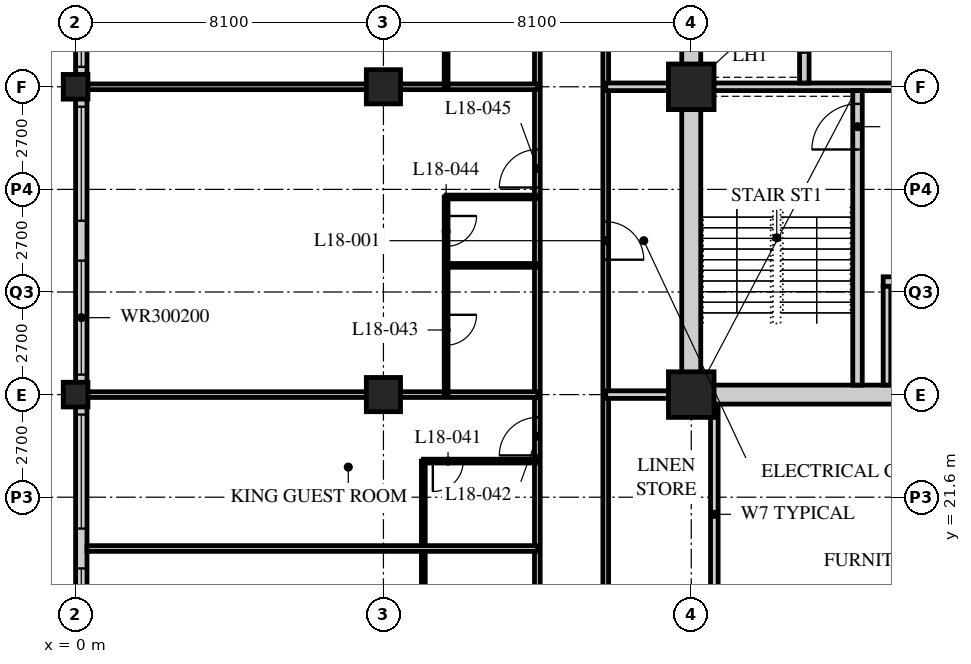
"""IFC4 building model, lengths in metres.
Left out: names, types, materials, properties, quantities, classifications, styles, units other than length and angle.
Written with IfcOpenShell. Run it as: python <this file> out.ifc"""

import sys

from ifc_helpers import new_model, si_unit, direction, frame, frame_2d, origin, origin_2d, place, context, subcontext, project, spatial, rectangle, hollow_rectangle, extrude, element, fill, save


model = new_model("IFC4")
c1 = context("Model", 3, precision=1e-05, world=origin(), true_north=direction((0.0, 1.0)))
c2 = subcontext(c1, "Body", "Model", "MODEL_VIEW")
j1 = project(units=[si_unit("LENGTHUNIT", "METRE"), si_unit("PLANEANGLEUNIT", "RADIAN")], contexts=[c1])
p1 = place(None, origin())
s1 = spatial("IfcSite", under=j1, at=p1, CompositionType="ELEMENT")
p2 = place(p1, origin())
s2 = spatial("IfcBuilding", under=s1, at=p2, CompositionType="ELEMENT")
p3 = place(p2, frame((0.0, 0.0, 73.8)))
s3 = spatial("IfcBuildingStorey", under=s2, at=p3, CompositionType="ELEMENT", Elevation=73.8)
for number, where, z_axis, x_axis in (
    (1, (0.0, 24.3, 0.0), (0.0, 0.0, 1.0), (1.0, 0.0, 0.0)),
    (2, (0.0, 32.4, 0.0), (0.0, 0.0, 1.0), (1.0, 0.0, 0.0)),
):
    element("IfcColumn", number, at=place(p3, frame(where, z_axis=z_axis, x_axis=x_axis)), inside=s3, PredefinedType="COLUMN", context=c2, shape_type="SweptSolid", body=[
        extrude(hollow_rectangle(XDim=0.65, YDim=0.65, WallThickness=0.05, at=origin_2d()), origin(), (0.0, 0.0, 1.0), 3.4),
    ])
for number, where, z_axis, x_axis in (
    (3, (8.1, 24.3, 0.0), (0.0, 0.0, 1.0), (1.0, 0.0, 0.0)),
    (4, (8.1, 32.4, 0.0), (0.0, 0.0, 1.0), (1.0, 0.0, 0.0)),
):
    element("IfcColumn", number, at=place(p3, frame(where, z_axis=z_axis, x_axis=x_axis)), inside=s3, PredefinedType="COLUMN", context=c2, shape_type="SweptSolid", body=[
        extrude(hollow_rectangle(XDim=0.9, YDim=0.9, WallThickness=0.09, at=origin_2d()), origin(), (0.0, 0.0, 1.0), 3.4),
    ])
for number, where, z_axis, x_axis in (
    (5, (16.2, 24.3, 0.0), (0.0, 0.0, 1.0), (1.0, 0.0, 0.0)),
    (6, (16.2, 32.4, 0.0), (0.0, 0.0, 1.0), (1.0, 0.0, 0.0)),
):
    element("IfcColumn", number, at=place(p3, frame(where, z_axis=z_axis, x_axis=x_axis)), inside=s3, PredefinedType="COLUMN", context=c2, shape_type="SweptSolid", body=[
        extrude(hollow_rectangle(XDim=1.2, YDim=1.2, WallThickness=0.12, at=origin_2d()), origin(), (0.0, 0.0, 1.0), 3.4),
    ])
p4 = place(p3, frame((0.15, 40.2, 0.0), z_axis=(0.0, 0.0, 1.0), x_axis=(0.0, -1.0, 0.0)))
e7 = element("IfcWall", 7, at=p4, inside=s3, PredefinedType="SOLIDWALL", context=c2, shape_type="SweptSolid", body=[
    extrude(rectangle(XDim=32.1, YDim=0.3, at=frame_2d((16.05, 0.0))), origin(), (0.0, 0.0, 1.0), 3.19),
])
p5 = place(p4, frame((0.225, 0.0, 0.9)))
e8 = element("IfcOpeningElement", 8, at=p5, cuts=e7, PredefinedType="OPENING", context=c2, shape_type="SweptSolid", body=[
    extrude(rectangle(XDim=3.0, YDim=2.0, at=frame_2d((1.5, 1.0))), frame((0.0, 0.16, 0.0), z_axis=(0.0, -1.0, 0.0), x_axis=(1.0, 0.0, 0.0)), (0.0, 0.0, 1.0), 0.32),
])
p6 = place(p4, frame((4.275, 0.0, 0.9)))
e9 = element("IfcOpeningElement", 9, at=p6, cuts=e7, PredefinedType="OPENING", context=c2, shape_type="SweptSolid", body=[
    extrude(rectangle(XDim=3.0, YDim=2.0, at=frame_2d((1.5, 1.0))), frame((0.0, 0.16, 0.0), z_axis=(0.0, -1.0, 0.0), x_axis=(1.0, 0.0, 0.0)), (0.0, 0.0, 1.0), 0.32),
])
p7 = place(p4, frame((8.325, 0.0, 0.9)))
e10 = element("IfcOpeningElement", 10, at=p7, cuts=e7, PredefinedType="OPENING", context=c2, shape_type="SweptSolid", body=[
    extrude(rectangle(XDim=3.0, YDim=2.0, at=frame_2d((1.5, 1.0))), frame((0.0, 0.16, 0.0), z_axis=(0.0, -1.0, 0.0), x_axis=(1.0, 0.0, 0.0)), (0.0, 0.0, 1.0), 0.32),
])
p8 = place(p4, frame((12.375, 0.0, 0.9)))
e11 = element("IfcOpeningElement", 11, at=p8, cuts=e7, PredefinedType="OPENING", context=c2, shape_type="SweptSolid", body=[
    extrude(rectangle(XDim=3.0, YDim=2.0, at=frame_2d((1.5, 1.0))), frame((0.0, 0.16, 0.0), z_axis=(0.0, -1.0, 0.0), x_axis=(1.0, 0.0, 0.0)), (0.0, 0.0, 1.0), 0.32),
])
p9 = place(p4, frame((16.425, 0.0, 0.9)))
e12 = element("IfcOpeningElement", 12, at=p9, cuts=e7, PredefinedType="OPENING", context=c2, shape_type="SweptSolid", body=[
    extrude(rectangle(XDim=3.0, YDim=2.0, at=frame_2d((1.5, 1.0))), frame((0.0, 0.16, 0.0), z_axis=(0.0, -1.0, 0.0), x_axis=(1.0, 0.0, 0.0)), (0.0, 0.0, 1.0), 0.32),
])
p10 = place(p4, frame((20.475, 0.0, 0.9)))
e13 = element("IfcOpeningElement", 13, at=p10, cuts=e7, PredefinedType="OPENING", context=c2, shape_type="SweptSolid", body=[
    extrude(rectangle(XDim=3.0, YDim=2.0, at=frame_2d((1.5, 1.0))), frame((0.0, 0.16, 0.0), z_axis=(0.0, -1.0, 0.0), x_axis=(1.0, 0.0, 0.0)), (0.0, 0.0, 1.0), 0.32),
])
p11 = place(p4, frame((24.525, 0.0, 0.9)))
e14 = element("IfcOpeningElement", 14, at=p11, cuts=e7, PredefinedType="OPENING", context=c2, shape_type="SweptSolid", body=[
    extrude(rectangle(XDim=3.0, YDim=2.0, at=frame_2d((1.5, 1.0))), frame((0.0, 0.16, 0.0), z_axis=(0.0, -1.0, 0.0), x_axis=(1.0, 0.0, 0.0)), (0.0, 0.0, 1.0), 0.32),
])
p12 = place(p4, frame((28.575, 0.0, 0.9)))
e15 = element("IfcOpeningElement", 15, at=p12, cuts=e7, PredefinedType="OPENING", context=c2, shape_type="SweptSolid", body=[
    extrude(rectangle(XDim=3.0, YDim=2.0, at=frame_2d((1.5, 1.0))), frame((0.0, 0.16, 0.0), z_axis=(0.0, -1.0, 0.0), x_axis=(1.0, 0.0, 0.0)), (0.0, 0.0, 1.0), 0.32),
])
p13 = place(p3, frame((12.15, 16.2, 0.0), z_axis=(0.0, 0.0, 1.0), x_axis=(0.0, 1.0, 0.0)))
e16 = element("IfcWall", 16, at=p13, inside=s3, PredefinedType="PARTITIONING", context=c2, shape_type="SweptSolid", body=[
    extrude(rectangle(XDim=26.1, YDim=0.15, at=frame_2d((13.05, 0.0))), origin(), (0.0, 0.0, 1.0), 3.19),
])
p14 = place(p13, frame((0.3, 0.0, 0.0)))
e17 = element("IfcOpeningElement", 17, at=p14, cuts=e16, PredefinedType="OPENING", context=c2, shape_type="SweptSolid", body=[
    extrude(rectangle(XDim=1.0, YDim=2.1, at=frame_2d((0.5, 1.05))), frame((0.0, 0.085, 0.0), z_axis=(0.0, -1.0, 0.0), x_axis=(1.0, 0.0, 0.0)), (0.0, 0.0, 1.0), 0.17),
])
p15 = place(p13, frame((6.5, 0.0, 0.0)))
e18 = element("IfcOpeningElement", 18, at=p15, cuts=e16, PredefinedType="OPENING", context=c2, shape_type="SweptSolid", body=[
    extrude(rectangle(XDim=1.0, YDim=2.1, at=frame_2d((0.5, 1.05))), frame((0.0, 0.085, 0.0), z_axis=(0.0, -1.0, 0.0), x_axis=(1.0, 0.0, 0.0)), (0.0, 0.0, 1.0), 0.17),
])
p16 = place(p13, frame((13.55, 0.0, 0.0)))
e19 = element("IfcOpeningElement", 19, at=p16, cuts=e16, PredefinedType="OPENING", context=c2, shape_type="SweptSolid", body=[
    extrude(rectangle(XDim=1.0, YDim=2.1, at=frame_2d((0.5, 1.05))), frame((0.0, 0.085, 0.0), z_axis=(0.0, -1.0, 0.0), x_axis=(1.0, 0.0, 0.0)), (0.0, 0.0, 1.0), 0.17),
])
p17 = place(p13, frame((21.65, 0.0, 0.0)))
e20 = element("IfcOpeningElement", 20, at=p17, cuts=e16, PredefinedType="OPENING", context=c2, shape_type="SweptSolid", body=[
    extrude(rectangle(XDim=1.0, YDim=2.1, at=frame_2d((0.5, 1.05))), frame((0.0, 0.085, 0.0), z_axis=(0.0, -1.0, 0.0), x_axis=(1.0, 0.0, 0.0)), (0.0, 0.0, 1.0), 0.17),
])
p18 = place(p3, frame((13.95, 40.5, 0.0), z_axis=(0.0, 0.0, 1.0), x_axis=(0.0, -1.0, 0.0)))
e21 = element("IfcWall", 21, at=p18, inside=s3, PredefinedType="PARTITIONING", context=c2, shape_type="SweptSolid", body=[
    extrude(rectangle(XDim=22.5, YDim=0.15, at=frame_2d((11.25, 0.0))), origin(), (0.0, 0.0, 1.0), 3.19),
])
p19 = place(p18, frame((11.65, 0.0, 0.0)))
e22 = element("IfcOpeningElement", 22, at=p19, cuts=e21, PredefinedType="OPENING", context=c2, shape_type="SweptSolid", body=[
    extrude(rectangle(XDim=1.0, YDim=2.1, at=frame_2d((0.5, 1.05))), frame((0.0, 0.085, 0.0), z_axis=(0.0, -1.0, 0.0), x_axis=(1.0, 0.0, 0.0)), (0.0, 0.0, 1.0), 0.17),
])
p20 = place(p18, frame((3.55, 0.0, 0.0)))
e23 = element("IfcOpeningElement", 23, at=p20, cuts=e21, PredefinedType="OPENING", context=c2, shape_type="SweptSolid", body=[
    extrude(rectangle(XDim=1.0, YDim=2.1, at=frame_2d((0.5, 1.05))), frame((0.0, 0.085, 0.0), z_axis=(0.0, -1.0, 0.0), x_axis=(1.0, 0.0, 0.0)), (0.0, 0.0, 1.0), 0.17),
])
p21 = place(p3, frame((13.95, 32.4, 0.0), z_axis=(0.0, 0.0, 1.0), x_axis=(1.0, 0.0, 0.0)))
e24 = element("IfcWall", 24, at=p21, inside=s3, PredefinedType="SOLIDWALL", context=c2, shape_type="SweptSolid", body=[
    extrude(rectangle(XDim=2.25, YDim=0.2, at=frame_2d((1.125, 0.0))), origin(), (0.0, 0.0, 1.0), 2.578),
])
p22 = place(p3, frame((16.807, 18.0, 0.0), z_axis=(0.0, 0.0, 1.0), x_axis=(0.0, 1.0, 0.0)))
e25 = element("IfcWall", 25, at=p22, inside=s3, PredefinedType="SOLIDWALL", context=c2, shape_type="SweptSolid", body=[
    extrude(rectangle(XDim=6.3, YDim=0.2, at=frame_2d((3.15, 0.0))), origin(), (0.0, 0.0, 1.0), 3.19),
])
p23 = place(p3, frame((13.95, 24.3, 0.0), z_axis=(0.0, 0.0, 1.0), x_axis=(1.0, 0.0, 0.0)))
e26 = element("IfcWall", 26, at=p23, inside=s3, PredefinedType="SOLIDWALL", context=c2, shape_type="SweptSolid", body=[
    extrude(rectangle(XDim=2.25, YDim=0.2, at=frame_2d((1.125, 0.0))), origin(), (0.0, 0.0, 1.0), 2.578),
])
p24 = place(p3, frame((9.15, 17.65, 0.0), z_axis=(0.0, 0.0, 1.0), x_axis=(0.0, 1.0, 0.0)))
e27 = element("IfcWall", 27, at=p24, inside=s3, PredefinedType="PARTITIONING", context=c2, shape_type="SweptSolid", body=[
    extrude(rectangle(XDim=4.9, YDim=0.1, at=frame_2d((2.45, 0.0))), origin(), (0.0, 0.0, 1.0), 3.19),
])
p25 = place(p3, frame((12.15, 20.25, 0.0), z_axis=(0.0, 0.0, 1.0), x_axis=(-1.0, 0.0, 0.0)))
e28 = element("IfcWall", 28, at=p25, inside=s3, PredefinedType="PARTITIONING", context=c2, shape_type="SweptSolid", body=[
    extrude(rectangle(XDim=11.85, YDim=0.15, at=frame_2d((5.925, 0.0))), origin(), (0.0, 0.0, 1.0), 3.19),
])
p26 = place(p3, frame((12.15, 22.55, 0.0), z_axis=(0.0, 0.0, 1.0), x_axis=(-1.0, 0.0, 0.0)))
e29 = element("IfcWall", 29, at=p26, inside=s3, PredefinedType="PARTITIONING", context=c2, shape_type="SweptSolid", body=[
    extrude(rectangle(XDim=3.0, YDim=0.1, at=frame_2d((1.5, 0.0))), origin(), (0.0, 0.0, 1.0), 3.19),
])
p27 = place(p26, frame((1.95, 0.0, 0.0)))
e30 = element("IfcOpeningElement", 30, at=p27, cuts=e29, PredefinedType="OPENING", context=c2, shape_type="SweptSolid", body=[
    extrude(rectangle(XDim=0.8, YDim=2.1, at=frame_2d((0.4, 1.05))), frame((0.0, 0.06, 0.0), z_axis=(0.0, -1.0, 0.0), x_axis=(1.0, 0.0, 0.0)), (0.0, 0.0, 1.0), 0.12),
])
p28 = place(p3, frame((12.15, 24.3, 0.0), z_axis=(0.0, 0.0, 1.0), x_axis=(-1.0, 0.0, 0.0)))
e31 = element("IfcWall", 31, at=p28, inside=s3, PredefinedType="PARTITIONING", context=c2, shape_type="SweptSolid", body=[
    extrude(rectangle(XDim=11.85, YDim=0.15, at=frame_2d((5.925, 0.0))), origin(), (0.0, 0.0, 1.0), 2.578),
])
p29 = place(p3, frame((9.75, 24.3, 0.0), z_axis=(0.0, 0.0, 1.0), x_axis=(0.0, 1.0, 0.0)))
e32 = element("IfcWall", 32, at=p29, inside=s3, PredefinedType="PARTITIONING", context=c2, shape_type="SweptSolid", body=[
    extrude(rectangle(XDim=5.2, YDim=0.1, at=frame_2d((2.6, 0.0))), origin(), (0.0, 0.0, 1.0), 3.19),
])
p30 = place(p29, frame((1.3, 0.0, 0.0)))
e33 = element("IfcOpeningElement", 33, at=p30, cuts=e32, PredefinedType="OPENING", context=c2, shape_type="SweptSolid", body=[
    extrude(rectangle(XDim=0.8, YDim=2.1, at=frame_2d((0.4, 1.05))), frame((0.0, 0.06, 0.0), z_axis=(0.0, -1.0, 0.0), x_axis=(1.0, 0.0, 0.0)), (0.0, 0.0, 1.0), 0.12),
])
p31 = place(p29, frame((3.9, 0.0, 0.0)))
e34 = element("IfcOpeningElement", 34, at=p31, cuts=e32, PredefinedType="OPENING", context=c2, shape_type="SweptSolid", body=[
    extrude(rectangle(XDim=0.8, YDim=2.1, at=frame_2d((0.4, 1.05))), frame((0.0, 0.06, 0.0), z_axis=(0.0, -1.0, 0.0), x_axis=(1.0, 0.0, 0.0)), (0.0, 0.0, 1.0), 0.12),
])
for number, where, z_axis, x_axis in (
    (35, (12.15, 27.7, 0.0), (0.0, 0.0, 1.0), (-1.0, 0.0, 0.0)),
    (36, (12.15, 29.5, 0.0), (0.0, 0.0, 1.0), (-1.0, 0.0, 0.0)),
):
    element("IfcWall", number, at=place(p3, frame(where, z_axis=z_axis, x_axis=x_axis)), inside=s3, PredefinedType="PARTITIONING", context=c2, shape_type="SweptSolid", body=[
        extrude(rectangle(XDim=2.4, YDim=0.1, at=frame_2d((1.2, 0.0))), origin(), (0.0, 0.0, 1.0), 3.19),
    ])
p32 = place(p3, frame((12.15, 32.4, 0.0), z_axis=(0.0, 0.0, 1.0), x_axis=(-1.0, 0.0, 0.0)))
e37 = element("IfcWall", 37, at=p32, inside=s3, PredefinedType="PARTITIONING", context=c2, shape_type="SweptSolid", body=[
    extrude(rectangle(XDim=11.85, YDim=0.15, at=frame_2d((5.925, 0.0))), origin(), (0.0, 0.0, 1.0), 2.578),
])
p33 = place(p3, frame((9.75, 32.4, 0.0), z_axis=(0.0, 0.0, 1.0), x_axis=(0.0, 1.0, 0.0)))
e38 = element("IfcWall", 38, at=p33, inside=s3, PredefinedType="PARTITIONING", context=c2, shape_type="SweptSolid", body=[
    extrude(rectangle(XDim=5.2, YDim=0.1, at=frame_2d((2.6, 0.0))), origin(), (0.0, 0.0, 1.0), 3.19),
])
p34 = place(p33, frame((1.3, 0.0, 0.0)))
e39 = element("IfcOpeningElement", 39, at=p34, cuts=e38, PredefinedType="OPENING", context=c2, shape_type="SweptSolid", body=[
    extrude(rectangle(XDim=0.8, YDim=2.1, at=frame_2d((0.4, 1.05))), frame((0.0, 0.06, 0.0), z_axis=(0.0, -1.0, 0.0), x_axis=(1.0, 0.0, 0.0)), (0.0, 0.0, 1.0), 0.12),
])
p35 = place(p33, frame((3.9, 0.0, 0.0)))
e40 = element("IfcOpeningElement", 40, at=p35, cuts=e38, PredefinedType="OPENING", context=c2, shape_type="SweptSolid", body=[
    extrude(rectangle(XDim=0.8, YDim=2.1, at=frame_2d((0.4, 1.05))), frame((0.0, 0.06, 0.0), z_axis=(0.0, -1.0, 0.0), x_axis=(1.0, 0.0, 0.0)), (0.0, 0.0, 1.0), 0.12),
])
p36 = place(p3, frame((15.95, 24.3, 0.0), z_axis=(0.0, 0.0, 1.0), x_axis=(1.0, 0.0, 0.0)))
e41 = element("IfcWall", 41, at=p36, inside=s3, PredefinedType="SOLIDWALL", context=c2, shape_type="SweptSolid", body=[
    extrude(rectangle(XDim=24.8, YDim=0.5, at=frame_2d((12.4, 0.0))), origin(), (0.0, 0.0, 1.0), 2.54),
])
p37 = place(p36, frame((11.5, 0.0, 0.0)))
e42 = element("IfcOpeningElement", 42, at=p37, cuts=e41, PredefinedType="OPENING", context=c2, shape_type="SweptSolid", body=[
    extrude(rectangle(XDim=1.8, YDim=2.4, at=frame_2d((0.9, 1.2))), frame((0.0, 0.26, 0.0), z_axis=(0.0, -1.0, 0.0), x_axis=(1.0, 0.0, 0.0)), (0.0, 0.0, 1.0), 0.52),
])
p38 = place(p3, frame((16.2, 24.55, 0.0), z_axis=(0.0, 0.0, 1.0), x_axis=(0.0, 1.0, 0.0)))
e43 = element("IfcWall", 43, at=p38, inside=s3, PredefinedType="SOLIDWALL", context=c2, shape_type="SweptSolid", body=[
    extrude(rectangle(XDim=15.7, YDim=0.5, at=frame_2d((7.85, 0.0))), origin(), (0.0, 0.0, 1.0), 2.578),
])
p39 = place(p3, frame((16.45, 32.4, 0.0), z_axis=(0.0, 0.0, 1.0), x_axis=(1.0, 0.0, 0.0)))
e44 = element("IfcWall", 44, at=p39, inside=s3, PredefinedType="SOLIDWALL", context=c2, shape_type="SweptSolid", body=[
    extrude(rectangle(XDim=7.95, YDim=0.2, at=frame_2d((3.975, 0.0))), origin(), (0.0, 0.0, 1.0), 2.578),
])
p40 = place(p3, frame((20.575, 24.55, 0.0), z_axis=(0.0, 0.0, 1.0), x_axis=(0.0, 1.0, 0.0)))
e45 = element("IfcWall", 45, at=p40, inside=s3, PredefinedType="SOLIDWALL", context=c2, shape_type="SweptSolid", body=[
    extrude(rectangle(XDim=7.75, YDim=0.25, at=frame_2d((3.875, 0.0))), origin(), (0.0, 0.0, 1.0), 3.19),
])
p41 = place(p40, frame((6.2, 0.0, 0.0)))
e46 = element("IfcOpeningElement", 46, at=p41, cuts=e45, PredefinedType="OPENING", context=c2, shape_type="SweptSolid", body=[
    extrude(rectangle(XDim=1.2, YDim=2.1, at=frame_2d((0.6, 1.05))), frame((0.0, 0.135, 0.0), z_axis=(0.0, -1.0, 0.0), x_axis=(1.0, 0.0, 0.0)), (0.0, 0.0, 1.0), 0.27),
])
p42 = place(p3, frame((21.25, 27.275, 0.0), z_axis=(0.0, 0.0, 1.0), x_axis=(1.0, 0.0, 0.0)))
e47 = element("IfcWall", 47, at=p42, inside=s3, PredefinedType="SOLIDWALL", context=c2, shape_type="SweptSolid", body=[
    extrude(rectangle(XDim=2.95, YDim=0.25, at=frame_2d((1.475, 0.0))), origin(), (0.0, 0.0, 1.0), 3.19),
])
p43 = place(p42, frame((0.95, 0.0, 0.0)))
e48 = element("IfcOpeningElement", 48, at=p43, cuts=e47, PredefinedType="OPENING", context=c2, shape_type="SweptSolid", body=[
    extrude(rectangle(XDim=1.1, YDim=2.4, at=frame_2d((0.55, 1.2))), frame((0.0, 0.135, 0.0), z_axis=(0.0, -1.0, 0.0), x_axis=(1.0, 0.0, 0.0)), (0.0, 0.0, 1.0), 0.27),
])
p44 = place(p3, frame((21.35, 24.55, 0.0), z_axis=(0.0, 0.0, 1.0), x_axis=(0.0, 1.0, 0.0)))
e49 = element("IfcWall", 49, at=p44, inside=s3, PredefinedType="SOLIDWALL", context=c2, shape_type="SweptSolid", body=[
    extrude(rectangle(XDim=2.6, YDim=0.2, at=frame_2d((1.3, 0.0))), origin(), (0.0, 0.0, 1.0), 3.19),
])
p45 = place(p3, frame((19.175, 32.5, 0.0), z_axis=(0.0, 0.0, 1.0), x_axis=(0.0, 1.0, 0.0)))
e50 = element("IfcWall", 50, at=p45, inside=s3, PredefinedType="SOLIDWALL", context=c2, shape_type="SweptSolid", body=[
    extrude(rectangle(XDim=7.75, YDim=0.25, at=frame_2d((3.875, 0.0))), origin(), (0.0, 0.0, 1.0), 3.19),
])
p46 = place(p45, frame((0.8, 0.0, 0.0)))
e51 = element("IfcOpeningElement", 51, at=p46, cuts=e50, PredefinedType="OPENING", context=c2, shape_type="SweptSolid", body=[
    extrude(rectangle(XDim=1.1, YDim=2.4, at=frame_2d((0.55, 1.2))), frame((0.0, 0.135, 0.0), z_axis=(0.0, -1.0, 0.0), x_axis=(1.0, 0.0, 0.0)), (0.0, 0.0, 1.0), 0.27),
])
p47 = place(p45, frame((3.4, 0.0, 0.0)))
e52 = element("IfcOpeningElement", 52, at=p47, cuts=e50, PredefinedType="OPENING", context=c2, shape_type="SweptSolid", body=[
    extrude(rectangle(XDim=1.1, YDim=2.4, at=frame_2d((0.55, 1.2))), frame((0.0, 0.135, 0.0), z_axis=(0.0, -1.0, 0.0), x_axis=(1.0, 0.0, 0.0)), (0.0, 0.0, 1.0), 0.27),
])
p48 = place(p45, frame((6.0, 0.0, 0.0)))
e53 = element("IfcOpeningElement", 53, at=p48, cuts=e50, PredefinedType="OPENING", context=c2, shape_type="SweptSolid", body=[
    extrude(rectangle(XDim=1.1, YDim=2.4, at=frame_2d((0.55, 1.2))), frame((0.0, 0.135, 0.0), z_axis=(0.0, -1.0, 0.0), x_axis=(1.0, 0.0, 0.0)), (0.0, 0.0, 1.0), 0.27),
])
p49 = place(p6, origin())
e54 = element("IfcWindow", 54, at=p49, inside=s3, PartitioningType="SINGLE_PANEL", PredefinedType="WINDOW", context=c2, shape_type="SweptSolid", body=[
    extrude(rectangle(XDim=3.0, YDim=2.0, at=frame_2d((1.5, 1.0))), frame((0.0, 0.03, 0.0), z_axis=(0.0, -1.0, 0.0), x_axis=(1.0, 0.0, 0.0)), (0.0, 0.0, 1.0), 0.06),
])
fill(e9, e54)
p50 = place(p7, origin())
e55 = element("IfcWindow", 55, at=p50, inside=s3, PartitioningType="SINGLE_PANEL", PredefinedType="WINDOW", context=c2, shape_type="SweptSolid", body=[
    extrude(rectangle(XDim=3.0, YDim=2.0, at=frame_2d((1.5, 1.0))), frame((0.0, 0.03, 0.0), z_axis=(0.0, -1.0, 0.0), x_axis=(1.0, 0.0, 0.0)), (0.0, 0.0, 1.0), 0.06),
])
fill(e10, e55)
p51 = place(p8, origin())
e56 = element("IfcWindow", 56, at=p51, inside=s3, PartitioningType="SINGLE_PANEL", PredefinedType="WINDOW", context=c2, shape_type="SweptSolid", body=[
    extrude(rectangle(XDim=3.0, YDim=2.0, at=frame_2d((1.5, 1.0))), frame((0.0, 0.03, 0.0), z_axis=(0.0, -1.0, 0.0), x_axis=(1.0, 0.0, 0.0)), (0.0, 0.0, 1.0), 0.06),
])
fill(e11, e56)
p52 = place(p9, origin())
e57 = element("IfcWindow", 57, at=p52, inside=s3, PartitioningType="SINGLE_PANEL", PredefinedType="WINDOW", context=c2, shape_type="SweptSolid", body=[
    extrude(rectangle(XDim=3.0, YDim=2.0, at=frame_2d((1.5, 1.0))), frame((0.0, 0.03, 0.0), z_axis=(0.0, -1.0, 0.0), x_axis=(1.0, 0.0, 0.0)), (0.0, 0.0, 1.0), 0.06),
])
fill(e12, e57)
p53 = place(p10, origin())
e58 = element("IfcWindow", 58, at=p53, inside=s3, PartitioningType="SINGLE_PANEL", PredefinedType="WINDOW", context=c2, shape_type="SweptSolid", body=[
    extrude(rectangle(XDim=3.0, YDim=2.0, at=frame_2d((1.5, 1.0))), frame((0.0, 0.03, 0.0), z_axis=(0.0, -1.0, 0.0), x_axis=(1.0, 0.0, 0.0)), (0.0, 0.0, 1.0), 0.06),
])
fill(e13, e58)
p54 = place(p19, origin())
e59 = element("IfcDoor", 59, at=p54, inside=s3, OperationType="SINGLE_SWING_RIGHT", PredefinedType="DOOR", context=c2, shape_type="SweptSolid", body=[
    extrude(rectangle(XDim=1.0, YDim=2.1, at=frame_2d((0.5, 1.05))), frame((0.0, 0.025, 0.0), z_axis=(0.0, -1.0, 0.0), x_axis=(1.0, 0.0, 0.0)), (0.0, 0.0, 1.0), 0.05),
])
fill(e22, e59)
p55 = place(p27, origin())
e60 = element("IfcDoor", 60, at=p55, inside=s3, OperationType="SINGLE_SWING_RIGHT", PredefinedType="DOOR", context=c2, shape_type="SweptSolid", body=[
    extrude(rectangle(XDim=0.8, YDim=2.1, at=frame_2d((0.4, 1.05))), frame((0.0, 0.025, 0.0), z_axis=(0.0, -1.0, 0.0), x_axis=(1.0, 0.0, 0.0)), (0.0, 0.0, 1.0), 0.05),
])
fill(e30, e60)
p56 = place(p15, origin())
e61 = element("IfcDoor", 61, at=p56, inside=s3, OperationType="SINGLE_SWING_LEFT", PredefinedType="DOOR", context=c2, shape_type="SweptSolid", body=[
    extrude(rectangle(XDim=1.0, YDim=2.1, at=frame_2d((0.5, 1.05))), frame((0.0, 0.025, 0.0), z_axis=(0.0, -1.0, 0.0), x_axis=(1.0, 0.0, 0.0)), (0.0, 0.0, 1.0), 0.05),
])
fill(e18, e61)
p57 = place(p30, origin())
e62 = element("IfcDoor", 62, at=p57, inside=s3, OperationType="SINGLE_SWING_LEFT", PredefinedType="DOOR", context=c2, shape_type="SweptSolid", body=[
    extrude(rectangle(XDim=0.8, YDim=2.1, at=frame_2d((0.4, 1.05))), frame((0.0, 0.025, 0.0), z_axis=(0.0, -1.0, 0.0), x_axis=(1.0, 0.0, 0.0)), (0.0, 0.0, 1.0), 0.05),
])
fill(e33, e62)
p58 = place(p31, origin())
e63 = element("IfcDoor", 63, at=p58, inside=s3, OperationType="SINGLE_SWING_LEFT", PredefinedType="DOOR", context=c2, shape_type="SweptSolid", body=[
    extrude(rectangle(XDim=0.8, YDim=2.1, at=frame_2d((0.4, 1.05))), frame((0.0, 0.025, 0.0), z_axis=(0.0, -1.0, 0.0), x_axis=(1.0, 0.0, 0.0)), (0.0, 0.0, 1.0), 0.05),
])
fill(e34, e63)
p59 = place(p16, origin())
e64 = element("IfcDoor", 64, at=p59, inside=s3, OperationType="SINGLE_SWING_LEFT", PredefinedType="DOOR", context=c2, shape_type="SweptSolid", body=[
    extrude(rectangle(XDim=1.0, YDim=2.1, at=frame_2d((0.5, 1.05))), frame((0.0, 0.025, 0.0), z_axis=(0.0, -1.0, 0.0), x_axis=(1.0, 0.0, 0.0)), (0.0, 0.0, 1.0), 0.05),
])
fill(e19, e64)
p60 = place(p41, origin())
e65 = element("IfcDoor", 65, at=p60, inside=s3, OperationType="SINGLE_SWING_LEFT", PredefinedType="DOOR", context=c2, shape_type="SweptSolid", body=[
    extrude(rectangle(XDim=1.2, YDim=2.1, at=frame_2d((0.6, 1.05))), frame((0.0, 0.025, 0.0), z_axis=(0.0, -1.0, 0.0), x_axis=(1.0, 0.0, 0.0)), (0.0, 0.0, 1.0), 0.05),
])
fill(e46, e65)
p61 = place(p46, origin())
e66 = element("IfcDoor", 66, at=p61, inside=s3, OperationType="DOUBLE_DOOR_SLIDING", PredefinedType="DOOR", context=c2, shape_type="SweptSolid", body=[
    extrude(rectangle(XDim=1.1, YDim=2.4, at=frame_2d((0.55, 1.2))), frame((0.0, 0.025, 0.0), z_axis=(0.0, -1.0, 0.0), x_axis=(1.0, 0.0, 0.0)), (0.0, 0.0, 1.0), 0.05),
])
fill(e51, e66)
save(model, sys.argv[1])
